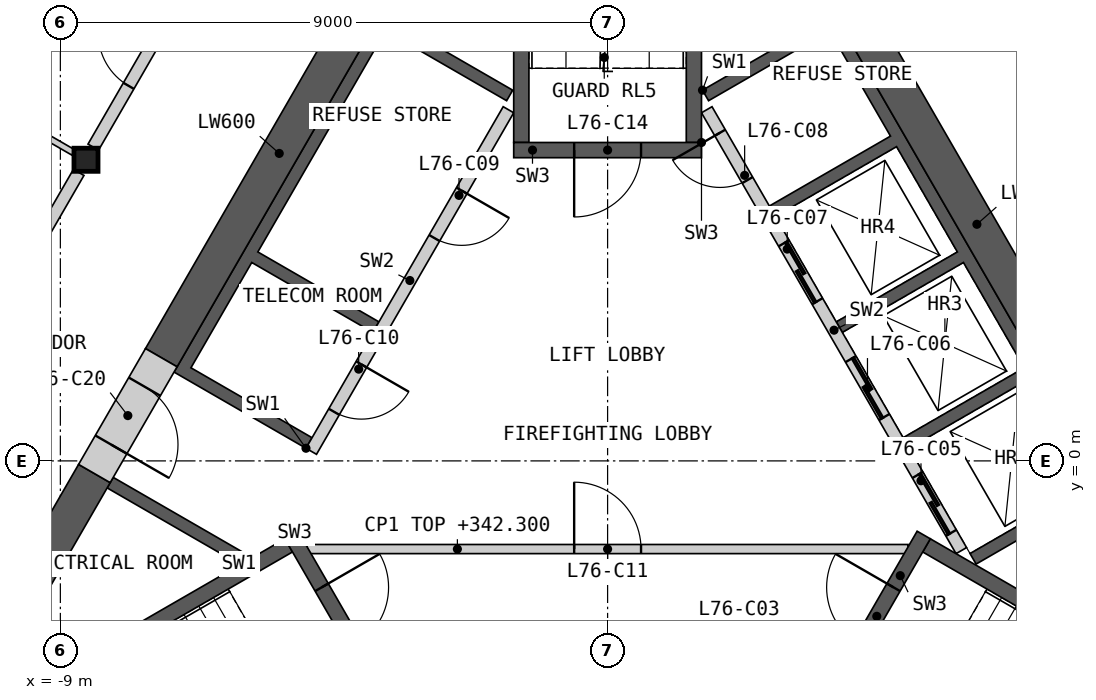
"""IFC4 building model, lengths in metres.
Left out: names, types, materials, properties, quantities, classifications, styles, units other than length and angle.
Written with IfcOpenShell. Run it as: python <this file> out.ifc"""

import sys

from ifc_helpers import new_model, si_unit, direction, frame, frame_2d, origin, origin_2d, place, context, subcontext, project, spatial, polyline, rectangle, i_section, outline, extrude, element, fill, save


model = new_model("IFC4")
c1 = context("Model", 3, precision=1e-05, world=origin(), true_north=direction((0.0, 1.0)))
c2 = subcontext(c1, "Body", "Model", "MODEL_VIEW")
j1 = project(units=[si_unit("LENGTHUNIT", "METRE"), si_unit("PLANEANGLEUNIT", "RADIAN")], contexts=[c1])
p1 = place(None, origin())
s1 = spatial("IfcSite", under=j1, at=p1, CompositionType="ELEMENT")
p2 = place(p1, origin())
s2 = spatial("IfcBuilding", under=s1, at=p2, CompositionType="ELEMENT")
p3 = place(p2, frame((0.0, 0.0, 339.2)))
s3 = spatial("IfcBuildingStorey", under=s2, at=p3, CompositionType="ELEMENT", Elevation=339.2)
p4 = place(p3, frame((-8.578, 4.953, 0.0), z_axis=(0.0, 0.0, 1.0), x_axis=(1.0, 0.0, 0.0)))
e1 = element("IfcColumn", 1, at=p4, inside=s3, PredefinedType="COLUMN", context=c2, shape_type="SweptSolid", body=[
    extrude(i_section(OverallWidth=0.396, OverallDepth=0.381, WebThickness=0.019, FlangeThickness=0.03, at=origin_2d()), origin(), (0.0, 0.0, 1.0), 3.4),
])
p5 = place(p3, origin())
e2 = element("IfcWall", 2, at=p5, inside=s3, PredefinedType="SHEAR", context=c2, shape_type="SweptSolid", body=[
    extrude(outline(polyline([(1.561, 6.097), (3.731, 7.35), (8.231, -0.444), (6.061, -1.697), (5.96, -1.524), (7.952, -0.374), (6.952, 1.358), (4.96, 0.208), (4.861, 0.381), (6.852, 1.531), (5.852, 3.263), (3.861, 2.113), (3.76, 2.287), (5.752, 3.437), (4.752, 5.169), (2.76, 4.019), (2.66, 4.192), (4.652, 5.342), (3.652, 7.074), (1.66, 5.924), (1.561, 6.097)])), origin(), (0.0, 0.0, 1.0), 3.1),
])
p6 = place(p3, frame((5.817, -1.476, 0.0), z_axis=(0.0, 0.0, 1.0), x_axis=(-0.500002616675, 0.866023893041, 0.0)))
e3 = element("IfcWall", 3, at=p6, inside=s3, PredefinedType="SOLIDWALL", context=c2, shape_type="SweptSolid", body=[
    extrude(rectangle(XDim=8.373, YDim=0.2, at=frame_2d((4.187, 0.0))), origin(), (0.0, 0.0, 1.0), 3.1),
])
p7 = place(p6, frame((0.337, 0.0, 0.0)))
e4 = element("IfcOpeningElement", 4, at=p7, cuts=e3, PredefinedType="OPENING", context=c2, shape_type="SweptSolid", body=[
    extrude(rectangle(XDim=1.1, YDim=2.1, at=frame_2d((0.55, 1.05))), frame((0.0, 0.11, 0.0), z_axis=(0.0, -1.0, 0.0), x_axis=(1.0, 0.0, 0.0)), (0.0, 0.0, 1.0), 0.22),
])
p8 = place(p6, frame((2.537, 0.0, 0.0)))
e5 = element("IfcOpeningElement", 5, at=p8, cuts=e3, PredefinedType="OPENING", context=c2, shape_type="SweptSolid", body=[
    extrude(rectangle(XDim=1.1, YDim=2.1, at=frame_2d((0.55, 1.05))), frame((0.0, 0.11, 0.0), z_axis=(0.0, -1.0, 0.0), x_axis=(1.0, 0.0, 0.0)), (0.0, 0.0, 1.0), 0.22),
])
p9 = place(p6, frame((4.737, 0.0, 0.0)))
e6 = element("IfcOpeningElement", 6, at=p9, cuts=e3, PredefinedType="OPENING", context=c2, shape_type="SweptSolid", body=[
    extrude(rectangle(XDim=1.1, YDim=2.1, at=frame_2d((0.55, 1.05))), frame((0.0, 0.11, 0.0), z_axis=(0.0, -1.0, 0.0), x_axis=(1.0, 0.0, 0.0)), (0.0, 0.0, 1.0), 0.22),
])
p10 = place(p6, frame((7.037, 0.0, 0.0)))
e7 = element("IfcOpeningElement", 7, at=p10, cuts=e3, PredefinedType="OPENING", context=c2, shape_type="SweptSolid", body=[
    extrude(rectangle(XDim=0.9, YDim=2.1, at=frame_2d((0.45, 1.05))), frame((0.0, 0.11, 0.0), z_axis=(0.0, -1.0, 0.0), x_axis=(1.0, 0.0, 0.0)), (0.0, 0.0, 1.0), 0.22),
])
p11 = place(p3, origin())
e8 = element("IfcWall", 8, at=p11, inside=s3, PredefinedType="SHEAR", context=c2, shape_type="SweptSolid", body=[
    extrude(outline(polyline([(-6.061, -1.697), (-8.231, -0.444), (-8.131, -0.271), (-5.96, -1.524), (-6.061, -1.697)])), origin(), (0.0, 0.0, 1.0), 3.1),
])
p12 = place(p3, origin())
e9 = element("IfcWall", 9, at=p12, inside=s3, PredefinedType="SHEAR", context=c2, shape_type="SweptSolid", body=[
    extrude(outline(polyline([(-4.96, 0.208), (-7.131, 1.461), (-3.731, 7.35), (-1.561, 6.097), (-1.66, 5.924), (-3.652, 7.074), (-5.752, 3.437), (-3.76, 2.287), (-3.861, 2.113), (-5.852, 3.263), (-6.852, 1.531), (-4.861, 0.381), (-4.96, 0.208)])), origin(), (0.0, 0.0, 1.0), 3.1),
])
p13 = place(p3, frame((-1.631, 5.776, 0.0), z_axis=(0.0, 0.0, 1.0), x_axis=(-0.499992876559, -0.866029516466, 0.0)))
e10 = element("IfcWall", 10, at=p13, inside=s3, PredefinedType="SOLIDWALL", context=c2, shape_type="SweptSolid", body=[
    extrude(rectangle(XDim=6.486, YDim=0.2, at=frame_2d((3.243, 0.0))), origin(), (0.0, 0.0, 1.0), 3.1),
])
p14 = place(p13, frame((1.537, 0.0, 0.0)))
e11 = element("IfcOpeningElement", 11, at=p14, cuts=e10, PredefinedType="OPENING", context=c2, shape_type="SweptSolid", body=[
    extrude(rectangle(XDim=0.9, YDim=2.1, at=frame_2d((0.45, 1.05))), frame((0.0, 0.11, 0.0), z_axis=(0.0, -1.0, 0.0), x_axis=(1.0, 0.0, 0.0)), (0.0, 0.0, 1.0), 0.22),
])
p15 = place(p13, frame((4.837, 0.0, 0.0)))
e12 = element("IfcOpeningElement", 12, at=p15, cuts=e10, PredefinedType="OPENING", context=c2, shape_type="SweptSolid", body=[
    extrude(rectangle(XDim=0.9, YDim=2.1, at=frame_2d((0.45, 1.05))), frame((0.0, 0.11, 0.0), z_axis=(0.0, -1.0, 0.0), x_axis=(1.0, 0.0, 0.0)), (0.0, 0.0, 1.0), 0.22),
])
p16 = place(p3, frame((-4.941, -1.45, 0.0), z_axis=(0.0, 0.0, 1.0), x_axis=(1.0, 0.0, 0.0)))
e13 = element("IfcWall", 13, at=p16, inside=s3, PredefinedType="PARTITIONING", context=c2, shape_type="SweptSolid", body=[
    extrude(rectangle(XDim=9.882, YDim=0.15, at=frame_2d((4.941, 0.0))), origin(), (0.0, 0.0, 1.0), 3.1),
])
p17 = place(p16, frame((4.391, 0.0, 0.0)))
e14 = element("IfcOpeningElement", 14, at=p17, cuts=e13, PredefinedType="OPENING", context=c2, shape_type="SweptSolid", body=[
    extrude(rectangle(XDim=1.1, YDim=2.1, at=frame_2d((0.55, 1.05))), frame((0.0, 0.085, 0.0), z_axis=(0.0, -1.0, 0.0), x_axis=(1.0, 0.0, 0.0)), (0.0, 0.0, 1.0), 0.17),
])
p18 = place(p3, origin())
e15 = element("IfcWall", 15, at=p18, inside=s3, PredefinedType="SHEAR", context=c2, shape_type="SweptSolid", body=[
    extrude(outline(polyline([(-5.307, -1.281), (-10.374, -4.206), (-10.032, -4.298), (-5.182, -1.498), (-5.307, -1.281)])), origin(), (0.0, 0.0, 1.0), 3.1),
])
p19 = place(p3, frame((-5.199, -1.219, 0.0), z_axis=(0.0, 0.0, 1.0), x_axis=(0.499982516597, -0.866035497597, 0.0)))
e16 = element("IfcWall", 16, at=p19, inside=s3, PredefinedType="SHEAR", context=c2, shape_type="SweptSolid", body=[
    extrude(rectangle(XDim=3.088, YDim=0.25, at=frame_2d((1.544, 0.0))), origin(), (0.0, 0.0, 1.0), 3.1),
])
p20 = place(p19, frame((0.994, 0.0, 0.0)))
e17 = element("IfcOpeningElement", 17, at=p20, cuts=e16, PredefinedType="OPENING", context=c2, shape_type="SweptSolid", body=[
    extrude(rectangle(XDim=1.1, YDim=2.1, at=frame_2d((0.55, 1.05))), frame((0.0, 0.135, 0.0), z_axis=(0.0, -1.0, 0.0), x_axis=(1.0, 0.0, 0.0)), (0.0, 0.0, 1.0), 0.27),
])
p21 = place(p3, origin())
e18 = element("IfcWall", 18, at=p21, inside=s3, PredefinedType="SHEAR", context=c2, shape_type="SweptSolid", body=[
    extrude(outline(polyline([(10.032, -4.298), (10.374, -4.206), (5.307, -1.281), (5.182, -1.498), (10.032, -4.298)])), origin(), (0.0, 0.0, 1.0), 3.1),
])
p22 = place(p3, frame((3.655, -3.893, 0.0), z_axis=(0.0, 0.0, 1.0), x_axis=(0.499982516597, 0.866035497597, 0.0)))
e19 = element("IfcWall", 19, at=p22, inside=s3, PredefinedType="SHEAR", context=c2, shape_type="SweptSolid", body=[
    extrude(rectangle(XDim=3.088, YDim=0.25, at=frame_2d((1.544, 0.0))), origin(), (0.0, 0.0, 1.0), 3.1),
])
p23 = place(p22, frame((0.994, 0.0, 0.0)))
e20 = element("IfcOpeningElement", 20, at=p23, cuts=e19, PredefinedType="OPENING", context=c2, shape_type="SweptSolid", body=[
    extrude(rectangle(XDim=1.1, YDim=2.1, at=frame_2d((0.55, 1.05))), frame((0.0, 0.135, 0.0), z_axis=(0.0, -1.0, 0.0), x_axis=(1.0, 0.0, 0.0)), (0.0, 0.0, 1.0), 0.27),
])
p24 = place(p3, origin())
e21 = element("IfcWall", 21, at=p24, inside=s3, PredefinedType="SHEAR", context=c2, shape_type="SweptSolid", body=[
    extrude(outline(polyline([(1.544, 5.237), (1.544, 11.087), (1.294, 10.837), (1.294, 5.237), (1.544, 5.237)])), origin(), (0.0, 0.0, 1.0), 3.1),
])
p25 = place(p3, origin())
e22 = element("IfcWall", 22, at=p25, inside=s3, PredefinedType="SHEAR", context=c2, shape_type="SweptSolid", body=[
    extrude(outline(polyline([(-1.294, 10.837), (-1.544, 11.087), (-1.544, 5.237), (-1.294, 5.237), (-1.294, 10.837)])), origin(), (0.0, 0.0, 1.0), 3.1),
])
p26 = place(p3, frame((1.544, 5.112, 0.0), z_axis=(0.0, 0.0, 1.0), x_axis=(-1.0, 0.0, 0.0)))
e23 = element("IfcWall", 23, at=p26, inside=s3, PredefinedType="SHEAR", context=c2, shape_type="SweptSolid", body=[
    extrude(rectangle(XDim=3.088, YDim=0.25, at=frame_2d((1.544, 0.0))), origin(), (0.0, 0.0, 1.0), 3.1),
])
p27 = place(p26, frame((0.994, 0.0, 0.0)))
e24 = element("IfcOpeningElement", 24, at=p27, cuts=e23, PredefinedType="OPENING", context=c2, shape_type="SweptSolid", body=[
    extrude(rectangle(XDim=1.1, YDim=2.1, at=frame_2d((0.55, 1.05))), frame((0.0, 0.135, 0.0), z_axis=(0.0, -1.0, 0.0), x_axis=(1.0, 0.0, 0.0)), (0.0, 0.0, 1.0), 0.27),
])
p28 = place(p3, frame((8.686, -0.634, 0.0), z_axis=(0.0, 0.0, 1.0), x_axis=(-0.50001836461, 0.866014800712, 0.0)))
e25 = element("IfcWall", 25, at=p28, inside=s3, PredefinedType="SHEAR", context=c2, shape_type="SweptSolid", body=[
    extrude(rectangle(XDim=10.451, YDim=0.6, at=frame_2d((5.225, 0.0))), origin(), (0.0, 0.0, 1.0), 3.1),
])
p29 = place(p3, frame((-3.461, 8.417, 0.0), z_axis=(0.0, 0.0, 1.0), x_axis=(-0.50000391502, -0.866023143435, 0.0)))
e26 = element("IfcWall", 26, at=p29, inside=s3, PredefinedType="SHEAR", context=c2, shape_type="SweptSolid", body=[
    extrude(rectangle(XDim=7.759, YDim=0.6, at=frame_2d((3.879, 0.0))), origin(), (0.0, 0.0, 1.0), 3.1),
])
p30 = place(p3, frame((-8.44, -0.208, 0.0), z_axis=(0.0, 0.0, 1.0), x_axis=(-0.500007425856, -0.866021116422, 0.0)))
e27 = element("IfcWall", 27, at=p30, inside=s3, PredefinedType="SHEAR", context=c2, shape_type="SweptSolid", body=[
    extrude(rectangle(XDim=4.969, YDim=0.6, at=frame_2d((2.484, 0.0))), origin(), (0.0, 0.0, 1.0), 3.1),
])
p31 = place(p3, frame((-7.34, 1.698, 0.0), z_axis=(0.0, 0.0, 1.0), x_axis=(-0.50002983664, -0.866008176907, 0.0)))
e28 = element("IfcWall", 28, at=p31, inside=s3, PredefinedType="SHEAR", context=c2, shape_type="SweptSolid", body=[
    extrude(rectangle(XDim=2.2, YDim=0.6, at=frame_2d((1.1, 0.0))), origin(), (0.0, 0.0, 1.0), 3.1),
])
p32 = place(p31, frame((0.55, 0.0, 0.0)))
e29 = element("IfcOpeningElement", 29, at=p32, cuts=e28, PredefinedType="OPENING", context=c2, shape_type="SweptSolid", body=[
    extrude(rectangle(XDim=1.1, YDim=2.1, at=frame_2d((0.55, 1.05))), frame((0.0, 0.31, 0.0), z_axis=(0.0, -1.0, 0.0), x_axis=(1.0, 0.0, 0.0)), (0.0, 0.0, 1.0), 0.62),
])
p33 = place(p3, frame((4.409, 12.174, 0.0), z_axis=(0.0, 0.0, 1.0), x_axis=(0.499984266882, -0.866034487114, 0.0)))
e30 = element("IfcWall", 30, at=p33, inside=s3, PredefinedType="PARTITIONING", context=c2, shape_type="SweptSolid", body=[
    extrude(rectangle(XDim=8.099, YDim=0.2, at=frame_2d((4.049, 0.0))), origin(), (0.0, 0.0, 1.0), 3.1),
])
p34 = place(p33, frame((5.123, 0.0, 0.0)))
e31 = element("IfcOpeningElement", 31, at=p34, cuts=e30, PredefinedType="OPENING", context=c2, shape_type="SweptSolid", body=[
    extrude(rectangle(XDim=1.0, YDim=2.1, at=frame_2d((0.5, 1.05))), frame((0.0, 0.11, 0.0), z_axis=(0.0, -1.0, 0.0), x_axis=(1.0, 0.0, 0.0)), (0.0, 0.0, 1.0), 0.22),
])
p35 = place(p33, frame((1.164, 0.0, 0.0)))
e32 = element("IfcOpeningElement", 32, at=p35, cuts=e30, PredefinedType="OPENING", context=c2, shape_type="SweptSolid", body=[
    extrude(rectangle(XDim=1.0, YDim=2.1, at=frame_2d((0.5, 1.05))), frame((0.0, 0.11, 0.0), z_axis=(0.0, -1.0, 0.0), x_axis=(1.0, 0.0, 0.0)), (0.0, 0.0, 1.0), 0.22),
])
p36 = place(p3, frame((-8.458, 5.16, 0.0), z_axis=(0.0, 0.0, 1.0), x_axis=(0.499984266882, 0.866034487114, 0.0)))
e33 = element("IfcWall", 33, at=p36, inside=s3, PredefinedType="PARTITIONING", context=c2, shape_type="SweptSolid", body=[
    extrude(rectangle(XDim=8.099, YDim=0.2, at=frame_2d((4.049, 0.0))), origin(), (0.0, 0.0, 1.0), 3.1),
])
p37 = place(p36, frame((1.164, 0.0, 0.0)))
e34 = element("IfcOpeningElement", 34, at=p37, cuts=e33, PredefinedType="OPENING", context=c2, shape_type="SweptSolid", body=[
    extrude(rectangle(XDim=1.0, YDim=2.1, at=frame_2d((0.5, 1.05))), frame((0.0, 0.11, 0.0), z_axis=(0.0, -1.0, 0.0), x_axis=(1.0, 0.0, 0.0)), (0.0, 0.0, 1.0), 0.22),
])
p38 = place(p3, frame((-12.748, -2.269, 0.0), z_axis=(0.0, 0.0, 1.0), x_axis=(0.499984266882, 0.866034487114, 0.0)))
e35 = element("IfcWall", 35, at=p38, inside=s3, PredefinedType="PARTITIONING", context=c2, shape_type="SweptSolid", body=[
    extrude(rectangle(XDim=8.099, YDim=0.2, at=frame_2d((4.049, 0.0))), origin(), (0.0, 0.0, 1.0), 3.1),
])
p39 = place(p3, frame((-19.615, 11.325, 0.0), z_axis=(0.0, 0.0, 1.0), x_axis=(0.86602139559, -0.500006942333, 0.0)))
e36 = element("IfcWall", 36, at=p39, inside=s3, PredefinedType="PARTITIONING", context=c2, shape_type="SweptSolid", body=[
    extrude(rectangle(XDim=12.505, YDim=0.1, at=frame_2d((6.252, 0.0))), origin(), (0.0, 0.0, 1.0), 2.33),
])
p40 = place(p39, frame((6.38, 0.0, 0.0)))
e37 = element("IfcOpeningElement", 37, at=p40, cuts=e36, PredefinedType="OPENING", context=c2, shape_type="SweptSolid", body=[
    extrude(rectangle(XDim=0.95, YDim=2.1, at=frame_2d((0.475, 1.05))), frame((0.0, 0.06, 0.0), z_axis=(0.0, -1.0, 0.0), x_axis=(1.0, 0.0, 0.0)), (0.0, 0.0, 1.0), 0.12),
])
p41 = place(p7, origin())
e38 = element("IfcDoor", 38, at=p41, inside=s3, OperationType="SLIDING_TO_LEFT", PredefinedType="DOOR", context=c2, shape_type="SweptSolid", body=[
    extrude(rectangle(XDim=1.1, YDim=2.1, at=frame_2d((0.55, 1.05))), frame((0.0, 0.025, 0.0), z_axis=(0.0, -1.0, 0.0), x_axis=(1.0, 0.0, 0.0)), (0.0, 0.0, 1.0), 0.05),
])
fill(e4, e38)
p42 = place(p8, origin())
e39 = element("IfcDoor", 39, at=p42, inside=s3, OperationType="SLIDING_TO_LEFT", PredefinedType="DOOR", context=c2, shape_type="SweptSolid", body=[
    extrude(rectangle(XDim=1.1, YDim=2.1, at=frame_2d((0.55, 1.05))), frame((0.0, 0.025, 0.0), z_axis=(0.0, -1.0, 0.0), x_axis=(1.0, 0.0, 0.0)), (0.0, 0.0, 1.0), 0.05),
])
fill(e5, e39)
p43 = place(p9, origin())
e40 = element("IfcDoor", 40, at=p43, inside=s3, OperationType="SLIDING_TO_LEFT", PredefinedType="DOOR", context=c2, shape_type="SweptSolid", body=[
    extrude(rectangle(XDim=1.1, YDim=2.1, at=frame_2d((0.55, 1.05))), frame((0.0, 0.025, 0.0), z_axis=(0.0, -1.0, 0.0), x_axis=(1.0, 0.0, 0.0)), (0.0, 0.0, 1.0), 0.05),
])
fill(e6, e40)
p44 = place(p10, origin())
e41 = element("IfcDoor", 41, at=p44, inside=s3, OperationType="SINGLE_SWING_RIGHT", PredefinedType="DOOR", context=c2, shape_type="SweptSolid", body=[
    extrude(rectangle(XDim=0.9, YDim=2.1, at=frame_2d((0.45, 1.05))), frame((0.0, 0.025, 0.0), z_axis=(0.0, -1.0, 0.0), x_axis=(1.0, 0.0, 0.0)), (0.0, 0.0, 1.0), 0.05),
])
fill(e7, e41)
p45 = place(p14, origin())
e42 = element("IfcDoor", 42, at=p45, inside=s3, OperationType="SINGLE_SWING_LEFT", PredefinedType="DOOR", context=c2, shape_type="SweptSolid", body=[
    extrude(rectangle(XDim=0.9, YDim=2.1, at=frame_2d((0.45, 1.05))), frame((0.0, 0.025, 0.0), z_axis=(0.0, -1.0, 0.0), x_axis=(1.0, 0.0, 0.0)), (0.0, 0.0, 1.0), 0.05),
])
fill(e11, e42)
p46 = place(p15, origin())
e43 = element("IfcDoor", 43, at=p46, inside=s3, OperationType="SINGLE_SWING_LEFT", PredefinedType="DOOR", context=c2, shape_type="SweptSolid", body=[
    extrude(rectangle(XDim=0.9, YDim=2.1, at=frame_2d((0.45, 1.05))), frame((0.0, 0.025, 0.0), z_axis=(0.0, -1.0, 0.0), x_axis=(1.0, 0.0, 0.0)), (0.0, 0.0, 1.0), 0.05),
])
fill(e12, e43)
p47 = place(p17, origin())
e44 = element("IfcDoor", 44, at=p47, inside=s3, OperationType="SINGLE_SWING_LEFT", PredefinedType="DOOR", context=c2, shape_type="SweptSolid", body=[
    extrude(rectangle(XDim=1.1, YDim=2.1, at=frame_2d((0.55, 1.05))), frame((0.0, 0.025, 0.0), z_axis=(0.0, -1.0, 0.0), x_axis=(1.0, 0.0, 0.0)), (0.0, 0.0, 1.0), 0.05),
])
fill(e14, e44)
p48 = place(p20, origin())
e45 = element("IfcDoor", 45, at=p48, inside=s3, OperationType="SINGLE_SWING_LEFT", PredefinedType="DOOR", context=c2, shape_type="SweptSolid", body=[
    extrude(rectangle(XDim=1.1, YDim=2.1, at=frame_2d((0.55, 1.05))), frame((0.0, 0.025, 0.0), z_axis=(0.0, -1.0, 0.0), x_axis=(1.0, 0.0, 0.0)), (0.0, 0.0, 1.0), 0.05),
])
fill(e17, e45)
p49 = place(p23, origin())
e46 = element("IfcDoor", 46, at=p49, inside=s3, OperationType="SINGLE_SWING_RIGHT", PredefinedType="DOOR", context=c2, shape_type="SweptSolid", body=[
    extrude(rectangle(XDim=1.1, YDim=2.1, at=frame_2d((0.55, 1.05))), frame((0.0, 0.025, 0.0), z_axis=(0.0, -1.0, 0.0), x_axis=(1.0, 0.0, 0.0)), (0.0, 0.0, 1.0), 0.05),
])
fill(e20, e46)
p50 = place(p27, origin())
e47 = element("IfcDoor", 47, at=p50, inside=s3, OperationType="SINGLE_SWING_RIGHT", PredefinedType="DOOR", context=c2, shape_type="SweptSolid", body=[
    extrude(rectangle(XDim=1.1, YDim=2.1, at=frame_2d((0.55, 1.05))), frame((0.0, 0.025, 0.0), z_axis=(0.0, -1.0, 0.0), x_axis=(1.0, 0.0, 0.0)), (0.0, 0.0, 1.0), 0.05),
])
fill(e24, e47)
p51 = place(p32, origin())
e48 = element("IfcDoor", 48, at=p51, inside=s3, OperationType="SINGLE_SWING_RIGHT", PredefinedType="DOOR", context=c2, shape_type="SweptSolid", body=[
    extrude(rectangle(XDim=1.1, YDim=2.1, at=frame_2d((0.55, 1.05))), frame((0.0, 0.055, 0.0), z_axis=(0.0, -1.0, 0.0), x_axis=(1.0, 0.0, 0.0)), (0.0, 0.0, 1.0), 0.05),
])
fill(e29, e48)
p52 = place(p37, origin())
e49 = element("IfcDoor", 49, at=p52, inside=s3, OperationType="SINGLE_SWING_RIGHT", PredefinedType="DOOR", context=c2, shape_type="SweptSolid", body=[
    extrude(rectangle(XDim=1.0, YDim=2.1, at=frame_2d((0.5, 1.05))), frame((0.0, 0.025, 0.0), z_axis=(0.0, -1.0, 0.0), x_axis=(1.0, 0.0, 0.0)), (0.0, 0.0, 1.0), 0.05),
])
fill(e34, e49)
save(model, sys.argv[1])
